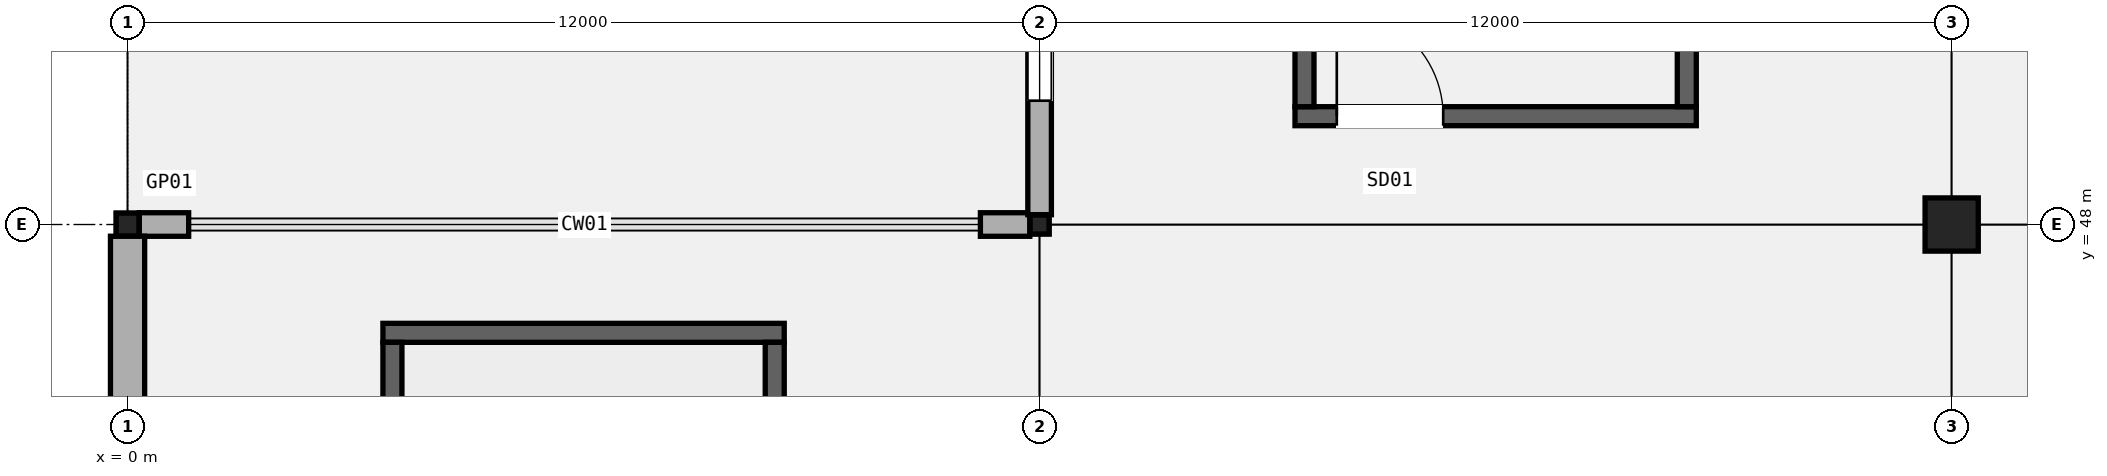
"""IFC4 building model, lengths in metres.
Left out: names, types, materials, properties, quantities, classifications, styles, units other than length and angle.
Written with IfcOpenShell. Run it as: python <this file> out.ifc"""

import sys

from ifc_helpers import new_model, si_unit, direction, frame, frame_2d, origin, origin_2d, place, context, subcontext, project, spatial, rectangle, hollow_rectangle, extrude, element, fill, save


model = new_model("IFC4")
c1 = context("Model", 3, precision=1e-05, world=origin(), true_north=direction((0.0, 1.0)))
c2 = subcontext(c1, "Body", "Model", "MODEL_VIEW")
j1 = project(units=[si_unit("LENGTHUNIT", "METRE"), si_unit("PLANEANGLEUNIT", "RADIAN")], contexts=[c1])
p1 = place(None, origin())
s1 = spatial("IfcSite", under=j1, at=p1, CompositionType="ELEMENT")
p2 = place(p1, origin())
s2 = spatial("IfcBuilding", under=s1, at=p2, CompositionType="ELEMENT")
p3 = place(p2, frame((0.0, 0.0, 20.4)))
s3 = spatial("IfcBuildingStorey", under=s2, at=p3, CompositionType="ELEMENT", Elevation=20.4)
p4 = place(p3, frame((0.0, 48.0, 0.0), z_axis=(0.0, 0.0, 1.0), x_axis=(1.0, 0.0, 0.0)))
e1 = element("IfcColumn", 1, at=p4, inside=s3, PredefinedType="COLUMN", context=c2, shape_type="SweptSolid", body=[
    extrude(hollow_rectangle(XDim=0.3, YDim=0.3, WallThickness=0.012, InnerFilletRadius=0.012, OuterFilletRadius=0.024, at=origin_2d()), origin(), (0.0, 0.0, 1.0), 5.4),
])
p5 = place(p3, frame((12.0, 48.0, 0.0), z_axis=(0.0, 0.0, 1.0), x_axis=(1.0, 0.0, 0.0)))
e2 = element("IfcColumn", 2, at=p5, inside=s3, PredefinedType="COLUMN", context=c2, shape_type="SweptSolid", body=[
    extrude(hollow_rectangle(XDim=0.25, YDim=0.25, WallThickness=0.012, InnerFilletRadius=0.012, OuterFilletRadius=0.024, at=origin_2d()), origin(), (0.0, 0.0, 1.0), 5.4),
])
p6 = place(p3, frame((24.0, 48.0, 0.0), z_axis=(0.0, 0.0, 1.0), x_axis=(1.0, 0.0, 0.0)))
e3 = element("IfcColumn", 3, at=p6, inside=s3, PredefinedType="COLUMN", context=c2, shape_type="SweptSolid", body=[
    extrude(rectangle(XDim=0.7, YDim=0.7, at=origin_2d()), origin(), (0.0, 0.0, 1.0), 5.4),
])
p7 = place(p3, frame((0.154, 48.0, 0.0), z_axis=(0.0, 0.0, 1.0), x_axis=(1.0, 0.0, 0.0)))
e4 = element("IfcWall", 4, at=p7, inside=s3, PredefinedType="SOLIDWALL", context=c2, shape_type="SweptSolid", body=[
    extrude(rectangle(XDim=0.65, YDim=0.31, at=frame_2d((0.325, 0.0))), origin(), (0.0, 0.0, 1.0), 4.58),
])
p8 = place(p3, frame((11.221, 48.0, 0.0), z_axis=(0.0, 0.0, 1.0), x_axis=(1.0, 0.0, 0.0)))
e5 = element("IfcWall", 5, at=p8, inside=s3, PredefinedType="SOLIDWALL", context=c2, shape_type="SweptSolid", body=[
    extrude(rectangle(XDim=0.65, YDim=0.31, at=frame_2d((0.325, 0.0))), origin(), (0.0, 0.0, 1.0), 4.58),
])
p9 = place(p3, frame((0.0, 36.179, 0.0), z_axis=(0.0, 0.0, 1.0), x_axis=(0.0, 1.0, 0.0)))
e6 = element("IfcWall", 6, at=p9, inside=s3, PredefinedType="SOLIDWALL", context=c2, shape_type="SweptSolid", body=[
    extrude(rectangle(XDim=11.667, YDim=0.45, at=frame_2d((5.833, 0.0))), origin(), (0.0, 0.0, 1.0), 4.48),
])
p10 = place(p9, frame((2.75, 0.0, 0.95)))
e7 = element("IfcOpeningElement", 7, at=p10, cuts=e6, PredefinedType="OPENING", context=c2, shape_type="SweptSolid", body=[
    extrude(rectangle(XDim=0.9, YDim=2.4, at=frame_2d((0.45, 1.2))), frame((0.0, 0.235, 0.0), z_axis=(0.0, -1.0, 0.0), x_axis=(1.0, 0.0, 0.0)), (0.0, 0.0, 1.0), 0.47),
])
p11 = place(p3, frame((12.0, 48.129, 0.0), z_axis=(0.0, 0.0, 1.0), x_axis=(0.0, 1.0, 0.0)))
e8 = element("IfcWall", 8, at=p11, inside=s3, PredefinedType="SOLIDWALL", context=c2, shape_type="SweptSolid", body=[
    extrude(rectangle(XDim=11.517, YDim=0.31, at=frame_2d((5.759, 0.0))), origin(), (0.0, 0.0, 1.0), 4.592),
])
p12 = place(p11, frame((1.5, 0.0, 0.95)))
e9 = element("IfcOpeningElement", 9, at=p12, cuts=e8, PredefinedType="OPENING", context=c2, shape_type="SweptSolid", body=[
    extrude(rectangle(XDim=1.65, YDim=2.05, at=frame_2d((0.825, 1.025))), frame((0.0, 0.165, 0.0), z_axis=(0.0, -1.0, 0.0), x_axis=(1.0, 0.0, 0.0)), (0.0, 0.0, 1.0), 0.33),
])
p13 = place(p3, frame((3.36, 46.575, 0.0), z_axis=(0.0, 0.0, 1.0), x_axis=(1.0, 0.0, 0.0)))
e10 = element("IfcWall", 10, at=p13, inside=s3, PredefinedType="SHEAR", context=c2, shape_type="SweptSolid", body=[
    extrude(rectangle(XDim=5.28, YDim=0.25, at=frame_2d((2.64, 0.0))), origin(), (0.0, 0.0, 1.0), 5.18),
])
for number, where, z_axis, x_axis in (
    (11, (3.485, 37.55, 0.0), (0.0, 0.0, 1.0), (0.0, 1.0, 0.0)),
    (12, (8.515, 37.55, 0.0), (0.0, 0.0, 1.0), (0.0, 1.0, 0.0)),
):
    element("IfcWall", number, at=place(p3, frame(where, z_axis=z_axis, x_axis=x_axis)), inside=s3, PredefinedType="SHEAR", context=c2, shape_type="SweptSolid", body=[
        extrude(rectangle(XDim=8.9, YDim=0.25, at=frame_2d((4.45, 0.0))), origin(), (0.0, 0.0, 1.0), 5.18),
    ])
p14 = place(p3, frame((15.36, 49.425, 0.0), z_axis=(0.0, 0.0, 1.0), x_axis=(1.0, 0.0, 0.0)))
e13 = element("IfcWall", 13, at=p14, inside=s3, PredefinedType="SHEAR", context=c2, shape_type="SweptSolid", body=[
    extrude(rectangle(XDim=5.28, YDim=0.25, at=frame_2d((2.64, 0.0))), origin(), (0.0, 0.0, 1.0), 5.18),
])
p15 = place(p14, frame((0.55, 0.0, 0.0)))
e14 = element("IfcOpeningElement", 14, at=p15, cuts=e13, PredefinedType="OPENING", context=c2, shape_type="SweptSolid", body=[
    extrude(rectangle(XDim=1.4, YDim=2.15, at=frame_2d((0.7, 1.075))), frame((0.0, 0.135, 0.0), z_axis=(0.0, -1.0, 0.0), x_axis=(1.0, 0.0, 0.0)), (0.0, 0.0, 1.0), 0.27),
])
for number, where, z_axis, x_axis in (
    (15, (15.485, 49.55, 0.0), (0.0, 0.0, 1.0), (0.0, 1.0, 0.0)),
    (16, (20.515, 49.55, 0.0), (0.0, 0.0, 1.0), (0.0, 1.0, 0.0)),
):
    element("IfcWall", number, at=place(p3, frame(where, z_axis=z_axis, x_axis=x_axis)), inside=s3, PredefinedType="SHEAR", context=c2, shape_type="SweptSolid", body=[
        extrude(rectangle(XDim=8.9, YDim=0.25, at=frame_2d((4.45, 0.0))), origin(), (0.0, 0.0, 1.0), 5.18),
    ])
p16 = place(p12, origin())
e17 = element("IfcWindow", 17, at=p16, inside=s3, PartitioningType="SINGLE_PANEL", PredefinedType="WINDOW", context=c2, shape_type="SweptSolid", body=[
    extrude(rectangle(XDim=1.65, YDim=2.05, at=frame_2d((0.825, 1.025))), frame((0.0, 0.03, 0.0), z_axis=(0.0, -1.0, 0.0), x_axis=(1.0, 0.0, 0.0)), (0.0, 0.0, 1.0), 0.06),
])
fill(e9, e17)
p17 = place(p15, origin())
e18 = element("IfcDoor", 18, at=p17, inside=s3, OperationType="SINGLE_SWING_LEFT", PredefinedType="DOOR", context=c2, shape_type="SweptSolid", body=[
    extrude(rectangle(XDim=1.4, YDim=2.15, at=frame_2d((0.7, 1.075))), frame((0.0, 0.025, 0.0), z_axis=(0.0, -1.0, 0.0), x_axis=(1.0, 0.0, 0.0)), (0.0, 0.0, 1.0), 0.05),
])
fill(e14, e18)
save(model, sys.argv[1])
